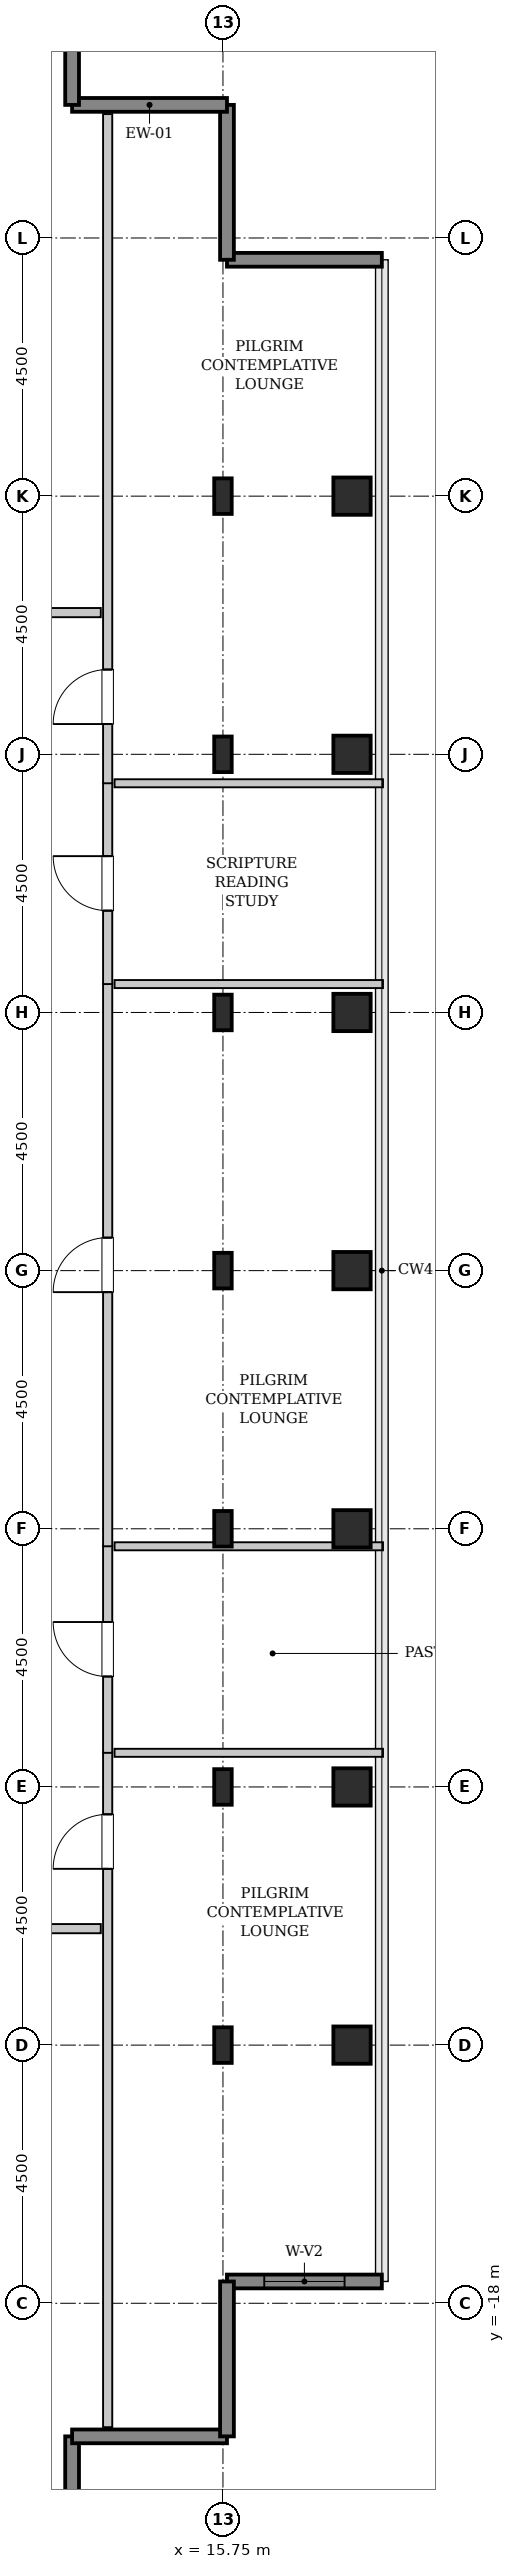
"""IFC4 building model, lengths in metres.
Left out: names, types, materials, properties, quantities, classifications, styles, units other than length and angle.
Written with IfcOpenShell. Run it as: python <this file> out.ifc"""

import sys

from ifc_helpers import new_model, si_unit, direction, frame, frame_2d, origin, origin_2d, place, context, subcontext, project, spatial, rectangle, hollow_rectangle, i_section, extrude, source, transform, mapped, element, fill, save


model = new_model("IFC4")
c1 = context("Model", 3, precision=1e-05, world=origin(), true_north=direction((0.0, 1.0)))
c2 = subcontext(c1, "Body", "Model", "MODEL_VIEW")
j1 = project(units=[si_unit("LENGTHUNIT", "METRE"), si_unit("PLANEANGLEUNIT", "RADIAN")], contexts=[c1])
p1 = place(None, origin())
s1 = spatial("IfcSite", under=j1, at=p1, CompositionType="ELEMENT")
p2 = place(p1, origin())
s2 = spatial("IfcBuilding", under=s1, at=p2, CompositionType="ELEMENT")
p3 = place(p2, frame((0.0, 0.0, 272.2)))
s3 = spatial("IfcBuildingStorey", under=s2, at=p3, CompositionType="ELEMENT", Elevation=272.2)
m1 = source(origin(), c2, "Body", "SweptSolid", [
    extrude(i_section(OverallWidth=0.305, OverallDepth=0.62, WebThickness=0.021, FlangeThickness=0.04, FilletRadius=0.027, at=origin_2d()), origin(), (0.0, 0.0, 1.0), 3.8),
])
for number, where, z_axis, x_axis in (
    (1, (15.75, -13.5, 0.0), (0.0, 0.0, 1.0), (1.0, 0.0, 0.0)),
    (2, (15.75, -9.0, 0.0), (0.0, 0.0, 1.0), (1.0, 0.0, 0.0)),
    (3, (15.75, -4.5, 0.0), (0.0, 0.0, 1.0), (1.0, 0.0, 0.0)),
    (4, (15.75, 0.0, 0.0), (0.0, 0.0, 1.0), (1.0, 0.0, 0.0)),
    (5, (15.75, 4.5, 0.0), (0.0, 0.0, 1.0), (1.0, 0.0, 0.0)),
    (6, (15.75, 9.0, 0.0), (0.0, 0.0, 1.0), (1.0, 0.0, 0.0)),
    (7, (15.75, 13.5, 0.0), (0.0, 0.0, 1.0), (1.0, 0.0, 0.0)),
):
    element("IfcColumn", number, at=place(p3, frame(where, z_axis=z_axis, x_axis=x_axis)), inside=s3, PredefinedType="COLUMN", context=c2, shape_type="MappedRepresentation", body=[
        mapped(m1, transform((0.0, 0.0, 0.0), x_axis=(1.0, 0.0, 0.0), y_axis=(0.0, 1.0, 0.0), z_axis=(0.0, 0.0, 1.0), scale=1.0)),
    ])
m2 = source(origin(), c2, "Body", "SweptSolid", [
    extrude(hollow_rectangle(XDim=0.65, YDim=0.65, WallThickness=0.032, InnerFilletRadius=0.032, OuterFilletRadius=0.064, at=origin_2d()), origin(), (0.0, 0.0, 1.0), 3.8),
])
for number, where, z_axis, x_axis in (
    (8, (18.0, -13.5, 0.0), (0.0, 0.0, 1.0), (1.0, 0.0, 0.0)),
    (9, (18.0, -9.0, 0.0), (0.0, 0.0, 1.0), (1.0, 0.0, 0.0)),
    (10, (18.0, -4.5, 0.0), (0.0, 0.0, 1.0), (1.0, 0.0, 0.0)),
    (11, (18.0, 0.0, 0.0), (0.0, 0.0, 1.0), (1.0, 0.0, 0.0)),
    (12, (18.0, 4.5, 0.0), (0.0, 0.0, 1.0), (1.0, 0.0, 0.0)),
    (13, (18.0, 9.0, 0.0), (0.0, 0.0, 1.0), (1.0, 0.0, 0.0)),
    (14, (18.0, 13.5, 0.0), (0.0, 0.0, 1.0), (1.0, 0.0, 0.0)),
):
    element("IfcColumn", number, at=place(p3, frame(where, z_axis=z_axis, x_axis=x_axis)), inside=s3, PredefinedType="COLUMN", context=c2, shape_type="MappedRepresentation", body=[
        mapped(m2, transform((0.0, 0.0, 0.0), x_axis=(1.0, 0.0, 0.0), y_axis=(0.0, 1.0, 0.0), z_axis=(0.0, 0.0, 1.0), scale=1.0)),
    ])
m3 = source(origin(), c2, "Body", "SweptSolid", [
    extrude(rectangle(XDim=2.7, YDim=0.24, at=frame_2d((1.35, 0.0))), origin(), (0.0, 0.0, 1.0), 3.55),
])
p4 = place(p3, frame((15.82, -17.62, 0.0), z_axis=(0.0, 0.0, 1.0), x_axis=(1.0, 0.0, 0.0)))
e15 = element("IfcWall", 15, at=p4, inside=s3, PredefinedType="SHEAR", context=c2, shape_type="MappedRepresentation", body=[
    mapped(m3, transform((0.0, 0.0, 0.0), x_axis=(1.0, 0.0, 0.0), y_axis=(0.0, 1.0, 0.0), z_axis=(0.0, 0.0, 1.0), scale=1.0)),
])
p5 = place(p4, frame((0.65, 0.0, 0.85)))
e16 = element("IfcOpeningElement", 16, at=p5, cuts=e15, PredefinedType="OPENING", context=c2, shape_type="SweptSolid", body=[
    extrude(rectangle(XDim=1.4, YDim=1.8, at=frame_2d((0.7, 0.9))), frame((0.0, 0.13, 0.0), z_axis=(0.0, -1.0, 0.0), x_axis=(1.0, 0.0, 0.0)), (0.0, 0.0, 1.0), 0.26),
])
for number, where, z_axis, x_axis in (
    (17, (18.52, 17.62, 0.0), (0.0, 0.0, 1.0), (-1.0, 0.0, 0.0)),
    (18, (15.82, 17.62, 0.0), (0.0, 0.0, 1.0), (0.0, 1.0, 0.0)),
    (19, (15.82, 20.32, 0.0), (0.0, 0.0, 1.0), (-1.0, 0.0, 0.0)),
    (20, (13.12, 20.32, 0.0), (0.0, 0.0, 1.0), (0.0, 1.0, 0.0)),
    (21, (13.12, -23.02, 0.0), (0.0, 0.0, 1.0), (0.0, 1.0, 0.0)),
    (22, (13.12, -20.32, 0.0), (0.0, 0.0, 1.0), (1.0, 0.0, 0.0)),
    (23, (15.82, -20.32, 0.0), (0.0, 0.0, 1.0), (0.0, 1.0, 0.0)),
):
    element("IfcWall", number, at=place(p3, frame(where, z_axis=z_axis, x_axis=x_axis)), inside=s3, PredefinedType="SHEAR", context=c2, shape_type="MappedRepresentation", body=[
        mapped(m3, transform((0.0, 0.0, 0.0), x_axis=(1.0, 0.0, 0.0), y_axis=(0.0, 1.0, 0.0), z_axis=(0.0, 0.0, 1.0), scale=1.0)),
    ])
m4 = source(origin(), c2, "Body", "SweptSolid", [
    extrude(rectangle(XDim=11.765, YDim=0.16, at=frame_2d((5.882, 0.0))), origin(), (0.0, 0.0, 1.0), 3.535),
])
p6 = place(p3, frame((13.74, -20.16, 0.0), z_axis=(0.0, 0.0, 1.0), x_axis=(0.0, 1.0, 0.0)))
e24 = element("IfcWall", 24, at=p6, inside=s3, PredefinedType="PARTITIONING", context=c2, shape_type="MappedRepresentation", body=[
    mapped(m4, transform((0.0, 0.0, 0.0), x_axis=(1.0, 0.0, 0.0), y_axis=(0.0, 1.0, 0.0), z_axis=(0.0, 0.0, 1.0), scale=1.0)),
])
p7 = place(p6, frame((9.732, 0.0, 0.0)))
e25 = element("IfcOpeningElement", 25, at=p7, cuts=e24, PredefinedType="OPENING", context=c2, shape_type="SweptSolid", body=[
    extrude(rectangle(XDim=0.95, YDim=2.1, at=frame_2d((0.475, 1.05))), frame((0.0, 0.09, 0.0), z_axis=(0.0, -1.0, 0.0), x_axis=(1.0, 0.0, 0.0)), (0.0, 0.0, 1.0), 0.18),
])
m5 = source(origin(), c2, "Body", "SweptSolid", [
    extrude(rectangle(XDim=4.68, YDim=0.14, at=frame_2d((2.34, 0.0))), origin(), (0.0, 0.0, 1.0), 3.535),
])
p8 = place(p3, frame((13.86, -8.405, 0.0), z_axis=(0.0, 0.0, 1.0), x_axis=(1.0, 0.0, 0.0)))
e26 = element("IfcWall", 26, at=p8, inside=s3, PredefinedType="PARTITIONING", context=c2, shape_type="MappedRepresentation", body=[
    mapped(m5, transform((0.0, 0.0, 0.0), x_axis=(1.0, 0.0, 0.0), y_axis=(0.0, 1.0, 0.0), z_axis=(0.0, 0.0, 1.0), scale=1.0)),
])
m6 = source(origin(), c2, "Body", "SweptSolid", [
    extrude(rectangle(XDim=3.61, YDim=0.16, at=frame_2d((1.805, 0.0))), origin(), (0.0, 0.0, 1.0), 3.535),
])
p9 = place(p3, frame((13.74, -8.405, 0.0), z_axis=(0.0, 0.0, 1.0), x_axis=(0.0, 1.0, 0.0)))
e27 = element("IfcWall", 27, at=p9, inside=s3, PredefinedType="PARTITIONING", context=c2, shape_type="MappedRepresentation", body=[
    mapped(m6, transform((0.0, 0.0, 0.0), x_axis=(1.0, 0.0, 0.0), y_axis=(0.0, 1.0, 0.0), z_axis=(0.0, 0.0, 1.0), scale=1.0)),
])
p10 = place(p9, frame((1.33, 0.0, 0.0)))
e28 = element("IfcOpeningElement", 28, at=p10, cuts=e27, PredefinedType="OPENING", context=c2, shape_type="SweptSolid", body=[
    extrude(rectangle(XDim=0.95, YDim=2.1, at=frame_2d((0.475, 1.05))), frame((0.0, 0.09, 0.0), z_axis=(0.0, -1.0, 0.0), x_axis=(1.0, 0.0, 0.0)), (0.0, 0.0, 1.0), 0.18),
])
m7 = source(origin(), c2, "Body", "SweptSolid", [
    extrude(rectangle(XDim=4.68, YDim=0.14, at=frame_2d((2.34, 0.0))), origin(), (0.0, 0.0, 1.0), 2.925),
])
p11 = place(p3, frame((13.86, -4.805, 0.0), z_axis=(0.0, 0.0, 1.0), x_axis=(1.0, 0.0, 0.0)))
e29 = element("IfcWall", 29, at=p11, inside=s3, PredefinedType="PARTITIONING", context=c2, shape_type="MappedRepresentation", body=[
    mapped(m7, transform((0.0, 0.0, 0.0), x_axis=(1.0, 0.0, 0.0), y_axis=(0.0, 1.0, 0.0), z_axis=(0.0, 0.0, 1.0), scale=1.0)),
])
m8 = source(origin(), c2, "Body", "SweptSolid", [
    extrude(rectangle(XDim=9.81, YDim=0.16, at=frame_2d((4.905, 0.0))), origin(), (0.0, 0.0, 1.0), 3.535),
])
p12 = place(p3, frame((13.74, -4.805, 0.0), z_axis=(0.0, 0.0, 1.0), x_axis=(0.0, 1.0, 0.0)))
e30 = element("IfcWall", 30, at=p12, inside=s3, PredefinedType="PARTITIONING", context=c2, shape_type="MappedRepresentation", body=[
    mapped(m8, transform((0.0, 0.0, 0.0), x_axis=(1.0, 0.0, 0.0), y_axis=(0.0, 1.0, 0.0), z_axis=(0.0, 0.0, 1.0), scale=1.0)),
])
p13 = place(p12, frame((4.43, 0.0, 0.0)))
e31 = element("IfcOpeningElement", 31, at=p13, cuts=e30, PredefinedType="OPENING", context=c2, shape_type="SweptSolid", body=[
    extrude(rectangle(XDim=0.95, YDim=2.1, at=frame_2d((0.475, 1.05))), frame((0.0, 0.09, 0.0), z_axis=(0.0, -1.0, 0.0), x_axis=(1.0, 0.0, 0.0)), (0.0, 0.0, 1.0), 0.18),
])
p14 = place(p3, frame((13.86, 4.995, 0.0), z_axis=(0.0, 0.0, 1.0), x_axis=(1.0, 0.0, 0.0)))
e32 = element("IfcWall", 32, at=p14, inside=s3, PredefinedType="PARTITIONING", context=c2, shape_type="MappedRepresentation", body=[
    mapped(m7, transform((0.0, 0.0, 0.0), x_axis=(1.0, 0.0, 0.0), y_axis=(0.0, 1.0, 0.0), z_axis=(0.0, 0.0, 1.0), scale=1.0)),
])
m9 = source(origin(), c2, "Body", "SweptSolid", [
    extrude(rectangle(XDim=3.51, YDim=0.16, at=frame_2d((1.755, 0.0))), origin(), (0.0, 0.0, 1.0), 3.535),
])
p15 = place(p3, frame((13.74, 4.995, 0.0), z_axis=(0.0, 0.0, 1.0), x_axis=(0.0, 1.0, 0.0)))
e33 = element("IfcWall", 33, at=p15, inside=s3, PredefinedType="PARTITIONING", context=c2, shape_type="MappedRepresentation", body=[
    mapped(m9, transform((0.0, 0.0, 0.0), x_axis=(1.0, 0.0, 0.0), y_axis=(0.0, 1.0, 0.0), z_axis=(0.0, 0.0, 1.0), scale=1.0)),
])
p16 = place(p15, frame((1.28, 0.0, 0.0)))
e34 = element("IfcOpeningElement", 34, at=p16, cuts=e33, PredefinedType="OPENING", context=c2, shape_type="SweptSolid", body=[
    extrude(rectangle(XDim=0.95, YDim=2.1, at=frame_2d((0.475, 1.05))), frame((0.0, 0.09, 0.0), z_axis=(0.0, -1.0, 0.0), x_axis=(1.0, 0.0, 0.0)), (0.0, 0.0, 1.0), 0.18),
])
p17 = place(p3, frame((13.86, 8.495, 0.0), z_axis=(0.0, 0.0, 1.0), x_axis=(1.0, 0.0, 0.0)))
e35 = element("IfcWall", 35, at=p17, inside=s3, PredefinedType="PARTITIONING", context=c2, shape_type="MappedRepresentation", body=[
    mapped(m7, transform((0.0, 0.0, 0.0), x_axis=(1.0, 0.0, 0.0), y_axis=(0.0, 1.0, 0.0), z_axis=(0.0, 0.0, 1.0), scale=1.0)),
])
m10 = source(origin(), c2, "Body", "SweptSolid", [
    extrude(rectangle(XDim=11.665, YDim=0.16, at=frame_2d((5.833, 0.0))), origin(), (0.0, 0.0, 1.0), 3.535),
])
p18 = place(p3, frame((13.74, 8.495, 0.0), z_axis=(0.0, 0.0, 1.0), x_axis=(0.0, 1.0, 0.0)))
e36 = element("IfcWall", 36, at=p18, inside=s3, PredefinedType="PARTITIONING", context=c2, shape_type="MappedRepresentation", body=[
    mapped(m10, transform((0.0, 0.0, 0.0), x_axis=(1.0, 0.0, 0.0), y_axis=(0.0, 1.0, 0.0), z_axis=(0.0, 0.0, 1.0), scale=1.0)),
])
p19 = place(p18, frame((1.032, 0.0, 0.0)))
e37 = element("IfcOpeningElement", 37, at=p19, cuts=e36, PredefinedType="OPENING", context=c2, shape_type="SweptSolid", body=[
    extrude(rectangle(XDim=0.95, YDim=2.1, at=frame_2d((0.475, 1.05))), frame((0.0, 0.09, 0.0), z_axis=(0.0, -1.0, 0.0), x_axis=(1.0, 0.0, 0.0)), (0.0, 0.0, 1.0), 0.18),
])
m11 = source(origin(), c2, "Body", "SweptSolid", [
    extrude(rectangle(XDim=5.425, YDim=0.16, at=frame_2d((2.712, 0.0))), origin(), (0.0, 0.0, 1.0), 3.535),
])
p20 = place(p3, frame((8.195, 11.47, 0.0), z_axis=(0.0, 0.0, 1.0), x_axis=(1.0, 0.0, 0.0)))
e38 = element("IfcWall", 38, at=p20, inside=s3, PredefinedType="PARTITIONING", context=c2, shape_type="MappedRepresentation", body=[
    mapped(m11, transform((0.0, 0.0, 0.0), x_axis=(1.0, 0.0, 0.0), y_axis=(0.0, 1.0, 0.0), z_axis=(0.0, 0.0, 1.0), scale=1.0)),
])
p21 = place(p20, frame((2.238, 0.0, 0.0)))
e39 = element("IfcOpeningElement", 39, at=p21, cuts=e38, PredefinedType="OPENING", context=c2, shape_type="SweptSolid", body=[
    extrude(rectangle(XDim=0.95, YDim=2.1, at=frame_2d((0.475, 1.05))), frame((0.0, 0.09, 0.0), z_axis=(0.0, -1.0, 0.0), x_axis=(1.0, 0.0, 0.0)), (0.0, 0.0, 1.0), 0.18),
])
m12 = source(origin(), c2, "Body", "SweptSolid", [
    extrude(rectangle(XDim=5.225, YDim=0.16, at=frame_2d((2.613, 0.0))), origin(), (0.0, 0.0, 1.0), 3.535),
])
p22 = place(p3, frame((8.395, -11.47, 0.0), z_axis=(0.0, 0.0, 1.0), x_axis=(1.0, 0.0, 0.0)))
e40 = element("IfcWall", 40, at=p22, inside=s3, PredefinedType="PARTITIONING", context=c2, shape_type="MappedRepresentation", body=[
    mapped(m12, transform((0.0, 0.0, 0.0), x_axis=(1.0, 0.0, 0.0), y_axis=(0.0, 1.0, 0.0), z_axis=(0.0, 0.0, 1.0), scale=1.0)),
])
p23 = place(p22, frame((2.137, 0.0, 0.0)))
e41 = element("IfcOpeningElement", 41, at=p23, cuts=e40, PredefinedType="OPENING", context=c2, shape_type="SweptSolid", body=[
    extrude(rectangle(XDim=0.95, YDim=2.1, at=frame_2d((0.475, 1.05))), frame((0.0, 0.09, 0.0), z_axis=(0.0, -1.0, 0.0), x_axis=(1.0, 0.0, 0.0)), (0.0, 0.0, 1.0), 0.18),
])
m13 = source(origin(), c2, "Body", "SweptSolid", [
    extrude(rectangle(XDim=1.4, YDim=1.8, at=frame_2d((0.7, 0.9))), frame((0.0, 0.03, 0.0), z_axis=(0.0, -1.0, 0.0), x_axis=(1.0, 0.0, 0.0)), (0.0, 0.0, 1.0), 0.06),
])
p24 = place(p5, origin())
e42 = element("IfcWindow", 42, at=p24, inside=s3, PartitioningType="SINGLE_PANEL", PredefinedType="WINDOW", context=c2, shape_type="MappedRepresentation", body=[
    mapped(m13, transform((0.0, 0.0, 0.0), x_axis=(1.0, 0.0, 0.0), y_axis=(0.0, 1.0, 0.0), z_axis=(0.0, 0.0, 1.0), scale=1.0)),
])
fill(e16, e42)
m14 = source(origin(), c2, "Body", "SweptSolid", [
    extrude(rectangle(XDim=0.95, YDim=2.1, at=frame_2d((0.475, 1.05))), frame((0.0, 0.025, 0.0), z_axis=(0.0, -1.0, 0.0), x_axis=(1.0, 0.0, 0.0)), (0.0, 0.0, 1.0), 0.05),
])
p25 = place(p7, origin())
e43 = element("IfcDoor", 43, at=p25, inside=s3, OperationType="SINGLE_SWING_LEFT", PredefinedType="DOOR", context=c2, shape_type="MappedRepresentation", body=[
    mapped(m14, transform((0.0, 0.0, 0.0), x_axis=(1.0, 0.0, 0.0), y_axis=(0.0, 1.0, 0.0), z_axis=(0.0, 0.0, 1.0), scale=1.0)),
])
fill(e25, e43)
p26 = place(p10, origin())
e44 = element("IfcDoor", 44, at=p26, inside=s3, OperationType="SINGLE_SWING_RIGHT", PredefinedType="DOOR", context=c2, shape_type="MappedRepresentation", body=[
    mapped(m14, transform((0.0, 0.0, 0.0), x_axis=(1.0, 0.0, 0.0), y_axis=(0.0, 1.0, 0.0), z_axis=(0.0, 0.0, 1.0), scale=1.0)),
])
fill(e28, e44)
p27 = place(p13, origin())
e45 = element("IfcDoor", 45, at=p27, inside=s3, OperationType="SINGLE_SWING_LEFT", PredefinedType="DOOR", context=c2, shape_type="MappedRepresentation", body=[
    mapped(m14, transform((0.0, 0.0, 0.0), x_axis=(1.0, 0.0, 0.0), y_axis=(0.0, 1.0, 0.0), z_axis=(0.0, 0.0, 1.0), scale=1.0)),
])
fill(e31, e45)
p28 = place(p16, origin())
e46 = element("IfcDoor", 46, at=p28, inside=s3, OperationType="SINGLE_SWING_RIGHT", PredefinedType="DOOR", context=c2, shape_type="MappedRepresentation", body=[
    mapped(m14, transform((0.0, 0.0, 0.0), x_axis=(1.0, 0.0, 0.0), y_axis=(0.0, 1.0, 0.0), z_axis=(0.0, 0.0, 1.0), scale=1.0)),
])
fill(e34, e46)
p29 = place(p19, origin())
e47 = element("IfcDoor", 47, at=p29, inside=s3, OperationType="SINGLE_SWING_LEFT", PredefinedType="DOOR", context=c2, shape_type="MappedRepresentation", body=[
    mapped(m14, transform((0.0, 0.0, 0.0), x_axis=(1.0, 0.0, 0.0), y_axis=(0.0, 1.0, 0.0), z_axis=(0.0, 0.0, 1.0), scale=1.0)),
])
fill(e37, e47)
save(model, sys.argv[1])
